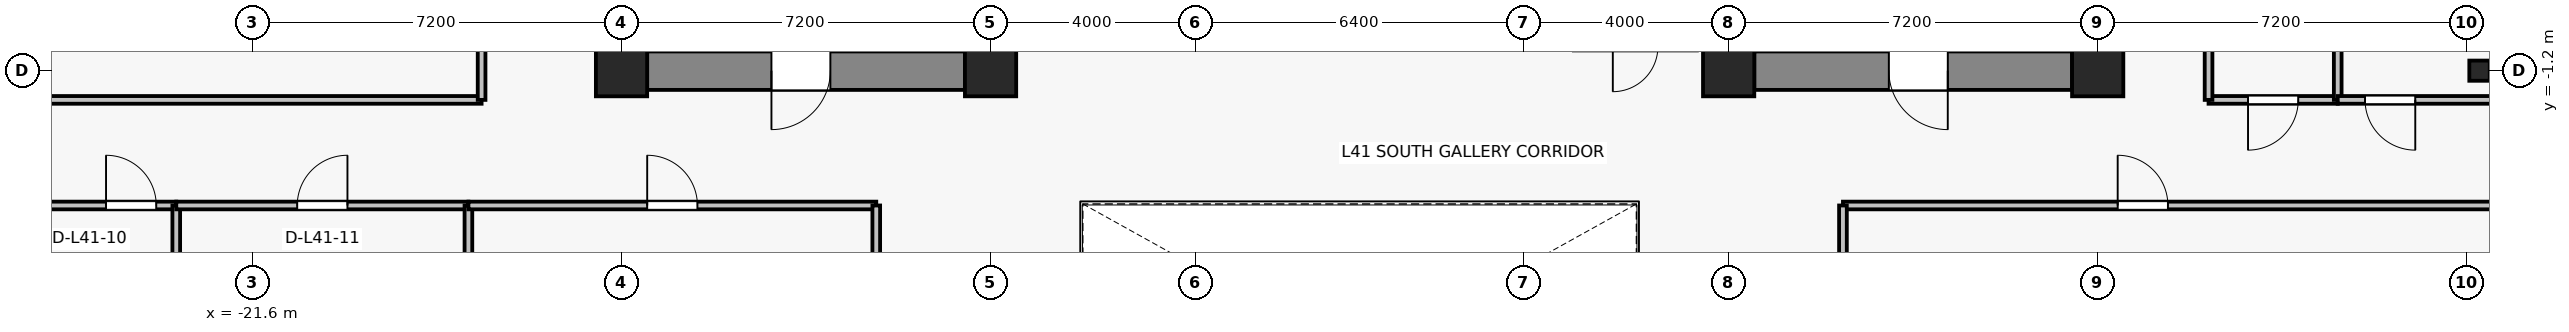
"""IFC4 building model, lengths in metres.
Left out: names, types, materials, properties, quantities, classifications, styles, units other than length and angle.
Written with IfcOpenShell. Run it as: python <this file> out.ifc"""

import sys

from ifc_helpers import new_model, si_unit, direction, frame, frame_2d, origin, origin_2d, place, context, subcontext, project, spatial, rectangle, i_section, extrude, source, transform, mapped, element, fill, save


model = new_model("IFC4")
c1 = context("Model", 3, precision=1e-05, world=origin(), true_north=direction((0.0, 1.0)))
c2 = subcontext(c1, "Body", "Model", "MODEL_VIEW")
j1 = project(units=[si_unit("LENGTHUNIT", "METRE"), si_unit("PLANEANGLEUNIT", "RADIAN")], contexts=[c1])
p1 = place(None, origin())
s1 = spatial("IfcSite", under=j1, at=p1, CompositionType="ELEMENT")
p2 = place(p1, origin())
s2 = spatial("IfcBuilding", under=s1, at=p2, CompositionType="ELEMENT")
p3 = place(p2, frame((0.0, 0.0, 149.5)))
s3 = spatial("IfcBuildingStorey", under=s2, at=p3, CompositionType="ELEMENT", Elevation=149.5)
for number, where, z_axis, x_axis in (
    (1, (-14.4, -1.2, 0.0), (0.0, 0.0, 1.0), (1.0, 0.0, 0.0)),
    (2, (-7.2, -1.2, 0.0), (0.0, 0.0, 1.0), (1.0, 0.0, 0.0)),
    (3, (7.2, -1.2, 0.0), (0.0, 0.0, 1.0), (1.0, 0.0, 0.0)),
    (4, (14.4, -1.2, 0.0), (0.0, 0.0, 1.0), (1.0, 0.0, 0.0)),
):
    element("IfcColumn", number, at=place(p3, frame(where, z_axis=z_axis, x_axis=x_axis)), inside=s3, PredefinedType="COLUMN", context=c2, shape_type="SweptSolid", body=[
        extrude(rectangle(XDim=1.0, YDim=1.0, at=origin_2d()), origin(), (0.0, 0.0, 1.0), 3.3),
    ])
p4 = place(p3, frame((21.85, -1.2, 0.0), z_axis=(0.0, 0.0, 1.0), x_axis=(1.0, 0.0, 0.0)))
e5 = element("IfcColumn", 5, at=p4, inside=s3, PredefinedType="COLUMN", context=c2, shape_type="SweptSolid", body=[
    extrude(i_section(OverallWidth=0.399, OverallDepth=0.394, WebThickness=0.023, FlangeThickness=0.037, FilletRadius=0.015, at=origin_2d()), origin(), (0.0, 0.0, 1.0), 3.3),
])
p5 = place(p3, frame((-7.7, -1.2, 0.0), z_axis=(0.0, 0.0, 1.0), x_axis=(-1.0, 0.0, 0.0)))
e6 = element("IfcWall", 6, at=p5, inside=s3, PredefinedType="SHEAR", context=c2, shape_type="SweptSolid", body=[
    extrude(rectangle(XDim=6.2, YDim=0.75, at=frame_2d((3.1, 0.0))), origin(), (0.0, 0.0, 1.0), 3.075),
])
p6 = place(p5, frame((2.625, 0.0, 0.0)))
e7 = element("IfcOpeningElement", 7, at=p6, cuts=e6, PredefinedType="OPENING", context=c2, shape_type="SweptSolid", body=[
    extrude(rectangle(XDim=1.15, YDim=2.15, at=frame_2d((0.575, 1.075))), frame((0.0, 0.385, 0.0), z_axis=(0.0, -1.0, 0.0), x_axis=(1.0, 0.0, 0.0)), (0.0, 0.0, 1.0), 0.77),
])
p7 = place(p3, frame((13.9, -1.2, 0.0), z_axis=(0.0, 0.0, 1.0), x_axis=(-1.0, 0.0, 0.0)))
e8 = element("IfcWall", 8, at=p7, inside=s3, PredefinedType="SHEAR", context=c2, shape_type="SweptSolid", body=[
    extrude(rectangle(XDim=6.2, YDim=0.75, at=frame_2d((3.1, 0.0))), origin(), (0.0, 0.0, 1.0), 3.075),
])
p8 = place(p7, frame((2.425, 0.0, 0.0)))
e9 = element("IfcOpeningElement", 9, at=p8, cuts=e8, PredefinedType="OPENING", context=c2, shape_type="SweptSolid", body=[
    extrude(rectangle(XDim=1.15, YDim=2.15, at=frame_2d((0.575, 1.075))), frame((0.0, 0.385, 0.0), z_axis=(0.0, -1.0, 0.0), x_axis=(1.0, 0.0, 0.0)), (0.0, 0.0, 1.0), 0.77),
])
p9 = place(p3, frame((-26.53, -3.83, 0.0), z_axis=(0.0, 0.0, 1.0), x_axis=(1.0, 0.0, 0.0)))
e10 = element("IfcWall", 10, at=p9, inside=s3, PredefinedType="PARTITIONING", context=c2, shape_type="SweptSolid", body=[
    extrude(rectangle(XDim=3.443, YDim=0.15, at=frame_2d((1.722, 0.0))), origin(), (0.0, 0.0, 1.0), 2.565),
])
p10 = place(p9, frame((2.073, 0.0, 0.0)))
e11 = element("IfcOpeningElement", 11, at=p10, cuts=e10, PredefinedType="OPENING", context=c2, shape_type="SweptSolid", body=[
    extrude(rectangle(XDim=0.98, YDim=2.15, at=frame_2d((0.49, 1.075))), frame((0.0, 0.085, 0.0), z_axis=(0.0, -1.0, 0.0), x_axis=(1.0, 0.0, 0.0)), (0.0, 0.0, 1.0), 0.17),
])
p11 = place(p3, frame((-23.087, -3.83, 0.0), z_axis=(0.0, 0.0, 1.0), x_axis=(0.0, -1.0, 0.0)))
e12 = element("IfcWall", 12, at=p11, inside=s3, PredefinedType="PARTITIONING", context=c2, shape_type="SweptSolid", body=[
    extrude(rectangle(XDim=8.49, YDim=0.15, at=frame_2d((4.245, 0.0))), origin(), (0.0, 0.0, 1.0), 2.565),
])
p12 = place(p3, frame((-23.087, -3.83, 0.0), z_axis=(0.0, 0.0, 1.0), x_axis=(1.0, 0.0, 0.0)))
e13 = element("IfcWall", 13, at=p12, inside=s3, PredefinedType="PARTITIONING", context=c2, shape_type="SweptSolid", body=[
    extrude(rectangle(XDim=5.7, YDim=0.15, at=frame_2d((2.85, 0.0))), origin(), (0.0, 0.0, 1.0), 3.075),
])
p13 = place(p12, frame((2.36, 0.0, 0.0)))
e14 = element("IfcOpeningElement", 14, at=p13, cuts=e13, PredefinedType="OPENING", context=c2, shape_type="SweptSolid", body=[
    extrude(rectangle(XDim=0.98, YDim=2.15, at=frame_2d((0.49, 1.075))), frame((0.0, 0.085, 0.0), z_axis=(0.0, -1.0, 0.0), x_axis=(1.0, 0.0, 0.0)), (0.0, 0.0, 1.0), 0.17),
])
p14 = place(p3, frame((-17.387, -3.83, 0.0), z_axis=(0.0, 0.0, 1.0), x_axis=(0.0, -1.0, 0.0)))
e15 = element("IfcWall", 15, at=p14, inside=s3, PredefinedType="PARTITIONING", context=c2, shape_type="SweptSolid", body=[
    extrude(rectangle(XDim=8.49, YDim=0.15, at=frame_2d((4.245, 0.0))), origin(), (0.0, 0.0, 1.0), 2.565),
])
p15 = place(p3, frame((-17.387, -3.83, 0.0), z_axis=(0.0, 0.0, 1.0), x_axis=(1.0, 0.0, 0.0)))
e16 = element("IfcWall", 16, at=p15, inside=s3, PredefinedType="PARTITIONING", context=c2, shape_type="SweptSolid", body=[
    extrude(rectangle(XDim=7.957, YDim=0.15, at=frame_2d((3.979, 0.0))), origin(), (0.0, 0.0, 1.0), 2.565),
])
p16 = place(p15, frame((3.488, 0.0, 0.0)))
e17 = element("IfcOpeningElement", 17, at=p16, cuts=e16, PredefinedType="OPENING", context=c2, shape_type="SweptSolid", body=[
    extrude(rectangle(XDim=0.98, YDim=2.15, at=frame_2d((0.49, 1.075))), frame((0.0, 0.085, 0.0), z_axis=(0.0, -1.0, 0.0), x_axis=(1.0, 0.0, 0.0)), (0.0, 0.0, 1.0), 0.17),
])
p17 = place(p3, frame((-9.43, -3.83, 0.0), z_axis=(0.0, 0.0, 1.0), x_axis=(0.0, -1.0, 0.0)))
e18 = element("IfcWall", 18, at=p17, inside=s3, PredefinedType="PARTITIONING", context=c2, shape_type="SweptSolid", body=[
    extrude(rectangle(XDim=8.49, YDim=0.15, at=frame_2d((4.245, 0.0))), origin(), (0.0, 0.0, 1.0), 2.565),
])
p18 = place(p3, frame((9.43, -3.83, 0.0), z_axis=(0.0, 0.0, 1.0), x_axis=(1.0, 0.0, 0.0)))
e19 = element("IfcWall", 19, at=p18, inside=s3, PredefinedType="PARTITIONING", context=c2, shape_type="SweptSolid", body=[
    extrude(rectangle(XDim=13.1, YDim=0.15, at=frame_2d((6.55, 0.0))), origin(), (0.0, 0.0, 1.0), 2.565),
])
p19 = place(p18, frame((5.36, 0.0, 0.0)))
e20 = element("IfcOpeningElement", 20, at=p19, cuts=e19, PredefinedType="OPENING", context=c2, shape_type="SweptSolid", body=[
    extrude(rectangle(XDim=0.98, YDim=2.15, at=frame_2d((0.49, 1.075))), frame((0.0, 0.085, 0.0), z_axis=(0.0, -1.0, 0.0), x_axis=(1.0, 0.0, 0.0)), (0.0, 0.0, 1.0), 0.17),
])
p20 = place(p3, frame((9.43, -12.32, 0.0), z_axis=(0.0, 0.0, 1.0), x_axis=(0.0, 1.0, 0.0)))
e21 = element("IfcWall", 21, at=p20, inside=s3, PredefinedType="PARTITIONING", context=c2, shape_type="SweptSolid", body=[
    extrude(rectangle(XDim=8.49, YDim=0.15, at=frame_2d((4.245, 0.0))), origin(), (0.0, 0.0, 1.0), 2.565),
])
p21 = place(p3, frame((-17.13, -1.77, 0.0), z_axis=(0.0, 0.0, 1.0), x_axis=(-1.0, 0.0, 0.0)))
e22 = element("IfcWall", 22, at=p21, inside=s3, PredefinedType="PARTITIONING", context=c2, shape_type="SweptSolid", body=[
    extrude(rectangle(XDim=9.4, YDim=0.15, at=frame_2d((4.7, 0.0))), origin(), (0.0, 0.0, 1.0), 2.565),
])
p22 = place(p3, frame((-17.13, 13.88, 0.0), z_axis=(0.0, 0.0, 1.0), x_axis=(0.0, -1.0, 0.0)))
e23 = element("IfcWall", 23, at=p22, inside=s3, PredefinedType="PARTITIONING", context=c2, shape_type="SweptSolid", body=[
    extrude(rectangle(XDim=15.65, YDim=0.15, at=frame_2d((7.825, 0.0))), origin(), (0.0, 0.0, 1.0), 2.565),
])
p23 = place(p22, frame((7.335, 0.0, 0.0)))
e24 = element("IfcOpeningElement", 24, at=p23, cuts=e23, PredefinedType="OPENING", context=c2, shape_type="SweptSolid", body=[
    extrude(rectangle(XDim=0.98, YDim=2.15, at=frame_2d((0.49, 1.075))), frame((0.0, 0.085, 0.0), z_axis=(0.0, -1.0, 0.0), x_axis=(1.0, 0.0, 0.0)), (0.0, 0.0, 1.0), 0.17),
])
p24 = place(p3, frame((19.083, -1.77, 0.0), z_axis=(0.0, 0.0, 1.0), x_axis=(-1.0, 0.0, 0.0)))
e25 = element("IfcWall", 25, at=p24, inside=s3, PredefinedType="PARTITIONING", context=c2, shape_type="SweptSolid", body=[
    extrude(rectangle(XDim=2.52, YDim=0.15, at=frame_2d((1.26, 0.0))), origin(), (0.0, 0.0, 1.0), 3.075),
])
p25 = place(p24, frame((0.77, 0.0, 0.0)))
e26 = element("IfcOpeningElement", 26, at=p25, cuts=e25, PredefinedType="OPENING", context=c2, shape_type="SweptSolid", body=[
    extrude(rectangle(XDim=0.98, YDim=2.15, at=frame_2d((0.49, 1.075))), frame((0.0, 0.085, 0.0), z_axis=(0.0, -1.0, 0.0), x_axis=(1.0, 0.0, 0.0)), (0.0, 0.0, 1.0), 0.17),
])
for number, where, z_axis, x_axis in (
    (27, (16.563, -1.77, 0.0), (0.0, 0.0, 1.0), (0.0, 1.0, 0.0)),
    (28, (19.083, 13.88, 0.0), (0.0, 0.0, 1.0), (0.0, -1.0, 0.0)),
):
    element("IfcWall", number, at=place(p3, frame(where, z_axis=z_axis, x_axis=x_axis)), inside=s3, PredefinedType="PARTITIONING", context=c2, shape_type="SweptSolid", body=[
        extrude(rectangle(XDim=15.65, YDim=0.15, at=frame_2d((7.825, 0.0))), origin(), (0.0, 0.0, 1.0), 2.565),
    ])
p26 = place(p3, frame((22.53, -1.77, 0.0), z_axis=(0.0, 0.0, 1.0), x_axis=(-1.0, 0.0, 0.0)))
e29 = element("IfcWall", 29, at=p26, inside=s3, PredefinedType="PARTITIONING", context=c2, shape_type="SweptSolid", body=[
    extrude(rectangle(XDim=3.447, YDim=0.15, at=frame_2d((1.724, 0.0))), origin(), (0.0, 0.0, 1.0), 2.565),
])
p27 = place(p26, frame((1.934, 0.0, 0.0)))
e30 = element("IfcOpeningElement", 30, at=p27, cuts=e29, PredefinedType="OPENING", context=c2, shape_type="SweptSolid", body=[
    extrude(rectangle(XDim=0.98, YDim=2.15, at=frame_2d((0.49, 1.075))), frame((0.0, 0.085, 0.0), z_axis=(0.0, -1.0, 0.0), x_axis=(1.0, 0.0, 0.0)), (0.0, 0.0, 1.0), 0.17),
])
m1 = source(origin(), c2, "Body", "SweptSolid", [
    extrude(rectangle(XDim=1.15, YDim=2.15, at=frame_2d((0.575, 1.075))), frame((0.0, 0.025, 0.0), z_axis=(0.0, -1.0, 0.0), x_axis=(1.0, 0.0, 0.0)), (0.0, 0.0, 1.0), 0.05),
])
p28 = place(p6, origin())
e31 = element("IfcDoor", 31, at=p28, inside=s3, OperationType="SINGLE_SWING_RIGHT", PredefinedType="DOOR", context=c2, shape_type="MappedRepresentation", body=[
    mapped(m1, transform((0.0, 0.0, 0.0), x_axis=(1.0, 0.0, 0.0), y_axis=(0.0, 1.0, 0.0), z_axis=(0.0, 0.0, 1.0), scale=1.0)),
])
fill(e7, e31)
p29 = place(p8, origin())
e32 = element("IfcDoor", 32, at=p29, inside=s3, OperationType="SINGLE_SWING_LEFT", PredefinedType="DOOR", context=c2, shape_type="MappedRepresentation", body=[
    mapped(m1, transform((0.0, 0.0, 0.0), x_axis=(1.0, 0.0, 0.0), y_axis=(0.0, 1.0, 0.0), z_axis=(0.0, 0.0, 1.0), scale=1.0)),
])
fill(e9, e32)
m2 = source(origin(), c2, "Body", "SweptSolid", [
    extrude(rectangle(XDim=0.98, YDim=2.15, at=frame_2d((0.49, 1.075))), frame((0.0, 0.025, 0.0), z_axis=(0.0, -1.0, 0.0), x_axis=(1.0, 0.0, 0.0)), (0.0, 0.0, 1.0), 0.05),
])
p30 = place(p10, origin())
e33 = element("IfcDoor", 33, at=p30, inside=s3, OperationType="SINGLE_SWING_LEFT", PredefinedType="DOOR", context=c2, shape_type="MappedRepresentation", body=[
    mapped(m2, transform((0.0, 0.0, 0.0), x_axis=(1.0, 0.0, 0.0), y_axis=(0.0, 1.0, 0.0), z_axis=(0.0, 0.0, 1.0), scale=1.0)),
])
fill(e11, e33)
p31 = place(p13, origin())
e34 = element("IfcDoor", 34, at=p31, inside=s3, OperationType="SINGLE_SWING_RIGHT", PredefinedType="DOOR", context=c2, shape_type="MappedRepresentation", body=[
    mapped(m2, transform((0.0, 0.0, 0.0), x_axis=(1.0, 0.0, 0.0), y_axis=(0.0, 1.0, 0.0), z_axis=(0.0, 0.0, 1.0), scale=1.0)),
])
fill(e14, e34)
p32 = place(p16, origin())
e35 = element("IfcDoor", 35, at=p32, inside=s3, OperationType="SINGLE_SWING_LEFT", PredefinedType="DOOR", context=c2, shape_type="MappedRepresentation", body=[
    mapped(m2, transform((0.0, 0.0, 0.0), x_axis=(1.0, 0.0, 0.0), y_axis=(0.0, 1.0, 0.0), z_axis=(0.0, 0.0, 1.0), scale=1.0)),
])
fill(e17, e35)
p33 = place(p19, origin())
e36 = element("IfcDoor", 36, at=p33, inside=s3, OperationType="SINGLE_SWING_LEFT", PredefinedType="DOOR", context=c2, shape_type="MappedRepresentation", body=[
    mapped(m2, transform((0.0, 0.0, 0.0), x_axis=(1.0, 0.0, 0.0), y_axis=(0.0, 1.0, 0.0), z_axis=(0.0, 0.0, 1.0), scale=1.0)),
])
fill(e20, e36)
p34 = place(p25, origin())
e37 = element("IfcDoor", 37, at=p34, inside=s3, OperationType="SINGLE_SWING_RIGHT", PredefinedType="DOOR", context=c2, shape_type="MappedRepresentation", body=[
    mapped(m2, transform((0.0, 0.0, 0.0), x_axis=(1.0, 0.0, 0.0), y_axis=(0.0, 1.0, 0.0), z_axis=(0.0, 0.0, 1.0), scale=1.0)),
])
fill(e26, e37)
p35 = place(p27, origin())
e38 = element("IfcDoor", 38, at=p35, inside=s3, OperationType="SINGLE_SWING_LEFT", PredefinedType="DOOR", context=c2, shape_type="MappedRepresentation", body=[
    mapped(m2, transform((0.0, 0.0, 0.0), x_axis=(1.0, 0.0, 0.0), y_axis=(0.0, 1.0, 0.0), z_axis=(0.0, 0.0, 1.0), scale=1.0)),
])
fill(e30, e38)
save(model, sys.argv[1])
